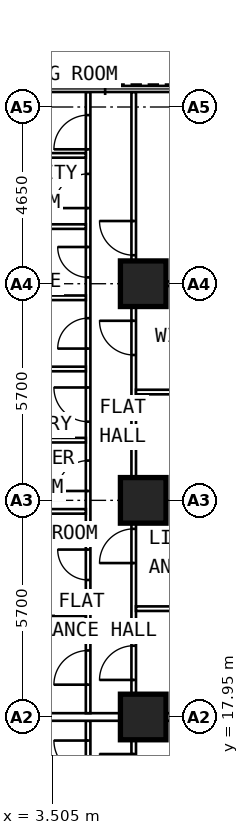
"""IFC4 building model, lengths in metres.
Left out: names, types, materials, properties, quantities, classifications, styles, units other than length and angle.
Written with IfcOpenShell. Run it as: python <this file> out.ifc"""

import sys

from ifc_helpers import new_model, si_unit, direction, frame, frame_2d, origin, origin_2d, place, context, subcontext, project, spatial, rectangle, extrude, element, fill, save


model = new_model("IFC4")
c1 = context("Model", 3, precision=1e-05, world=origin(), true_north=direction((0.0, 1.0)))
c2 = subcontext(c1, "Body", "Model", "MODEL_VIEW")
j1 = project(units=[si_unit("LENGTHUNIT", "METRE"), si_unit("PLANEANGLEUNIT", "RADIAN")], contexts=[c1])
p1 = place(None, origin())
s1 = spatial("IfcSite", under=j1, at=p1, CompositionType="ELEMENT")
p2 = place(p1, origin())
s2 = spatial("IfcBuilding", under=s1, at=p2, CompositionType="ELEMENT")
p3 = place(p2, frame((0.0, 0.0, 91.6)))
s3 = spatial("IfcBuildingStorey", under=s2, at=p3, CompositionType="ELEMENT", Elevation=91.6)
for number, where, z_axis, x_axis in (
    (1, (5.9, 17.95, 0.0), (0.0, 0.0, 1.0), (0.0, 1.0, 0.0)),
    (2, (5.9, 23.65, 0.0), (0.0, 0.0, 1.0), (0.0, 1.0, 0.0)),
    (3, (5.9, 29.35, 0.0), (0.0, 0.0, 1.0), (0.0, 1.0, 0.0)),
):
    element("IfcColumn", number, at=place(p3, frame(where, z_axis=z_axis, x_axis=x_axis)), inside=s3, PredefinedType="COLUMN", context=c2, shape_type="SweptSolid", body=[
        extrude(rectangle(XDim=1.2, YDim=1.2, at=origin_2d()), origin(), (0.0, 0.0, 1.0), 3.6),
    ])
p4 = place(p3, frame((4.45, 10.1, 0.0), z_axis=(0.0, 0.0, 1.0), x_axis=(0.0, 1.0, 0.0)))
e4 = element("IfcWall", 4, at=p4, inside=s3, PredefinedType="PARTITIONING", context=c2, shape_type="SweptSolid", body=[
    extrude(rectangle(XDim=7.75, YDim=0.12, at=frame_2d((3.875, 0.0))), origin(), (0.0, 0.0, 1.0), 3.35),
])
p5 = place(p4, frame((0.75, 0.0, 0.0)))
e5 = element("IfcOpeningElement", 5, at=p5, cuts=e4, PredefinedType="OPENING", context=c2, shape_type="SweptSolid", body=[
    extrude(rectangle(XDim=0.9, YDim=2.1, at=frame_2d((0.45, 1.05))), frame((0.0, 0.072, 0.0), z_axis=(0.0, -1.0, 0.0), x_axis=(1.0, 0.0, 0.0)), (0.0, 0.0, 1.0), 0.144),
])
p6 = place(p4, frame((3.705, 0.0, 0.0)))
e6 = element("IfcOpeningElement", 6, at=p6, cuts=e4, PredefinedType="OPENING", context=c2, shape_type="SweptSolid", body=[
    extrude(rectangle(XDim=0.8, YDim=2.1, at=frame_2d((0.4, 1.05))), frame((0.0, 0.072, 0.0), z_axis=(0.0, -1.0, 0.0), x_axis=(1.0, 0.0, 0.0)), (0.0, 0.0, 1.0), 0.144),
])
p7 = place(p4, frame((6.33, 0.0, 0.0)))
e7 = element("IfcOpeningElement", 7, at=p7, cuts=e4, PredefinedType="OPENING", context=c2, shape_type="SweptSolid", body=[
    extrude(rectangle(XDim=0.9, YDim=2.1, at=frame_2d((0.45, 1.05))), frame((0.0, 0.072, 0.0), z_axis=(0.0, -1.0, 0.0), x_axis=(1.0, 0.0, 0.0)), (0.0, 0.0, 1.0), 0.144),
])
p8 = place(p3, frame((5.65, 9.6, 0.0), z_axis=(0.0, 0.0, 1.0), x_axis=(0.0, 1.0, 0.0)))
e8 = element("IfcWall", 8, at=p8, inside=s3, PredefinedType="PARTITIONING", context=c2, shape_type="SweptSolid", body=[
    extrude(rectangle(XDim=8.1, YDim=0.12, at=frame_2d((4.05, 0.0))), origin(), (0.0, 0.0, 1.0), 3.35),
])
p9 = place(p8, frame((3.4, 0.0, 0.0)))
e9 = element("IfcOpeningElement", 9, at=p9, cuts=e8, PredefinedType="OPENING", context=c2, shape_type="SweptSolid", body=[
    extrude(rectangle(XDim=0.9, YDim=2.1, at=frame_2d((0.45, 1.05))), frame((0.0, 0.072, 0.0), z_axis=(0.0, -1.0, 0.0), x_axis=(1.0, 0.0, 0.0)), (0.0, 0.0, 1.0), 0.144),
])
p10 = place(p8, frame((6.475, 0.0, 0.0)))
e10 = element("IfcOpeningElement", 10, at=p10, cuts=e8, PredefinedType="OPENING", context=c2, shape_type="SweptSolid", body=[
    extrude(rectangle(XDim=0.9, YDim=2.1, at=frame_2d((0.45, 1.05))), frame((0.0, 0.072, 0.0), z_axis=(0.0, -1.0, 0.0), x_axis=(1.0, 0.0, 0.0)), (0.0, 0.0, 1.0), 0.144),
])
p11 = place(p3, frame((4.45, 18.05, 0.0), z_axis=(0.0, 0.0, 1.0), x_axis=(0.0, 1.0, 0.0)))
e11 = element("IfcWall", 11, at=p11, inside=s3, PredefinedType="PARTITIONING", context=c2, shape_type="SweptSolid", body=[
    extrude(rectangle(XDim=16.345, YDim=0.12, at=frame_2d((8.172, 0.0))), origin(), (0.0, 0.0, 1.0), 3.35),
])
p12 = place(p11, frame((0.75, 0.0, 0.0)))
e12 = element("IfcOpeningElement", 12, at=p12, cuts=e11, PredefinedType="OPENING", context=c2, shape_type="SweptSolid", body=[
    extrude(rectangle(XDim=0.9, YDim=2.1, at=frame_2d((0.45, 1.05))), frame((0.0, 0.072, 0.0), z_axis=(0.0, -1.0, 0.0), x_axis=(1.0, 0.0, 0.0)), (0.0, 0.0, 1.0), 0.144),
])
p13 = place(p11, frame((3.505, 0.0, 0.0)))
e13 = element("IfcOpeningElement", 13, at=p13, cuts=e11, PredefinedType="OPENING", context=c2, shape_type="SweptSolid", body=[
    extrude(rectangle(XDim=0.8, YDim=2.1, at=frame_2d((0.4, 1.05))), frame((0.0, 0.072, 0.0), z_axis=(0.0, -1.0, 0.0), x_axis=(1.0, 0.0, 0.0)), (0.0, 0.0, 1.0), 0.144),
])
p14 = place(p11, frame((5.847, 0.0, 0.0)))
e14 = element("IfcOpeningElement", 14, at=p14, cuts=e11, PredefinedType="OPENING", context=c2, shape_type="SweptSolid", body=[
    extrude(rectangle(XDim=0.8, YDim=2.1, at=frame_2d((0.4, 1.05))), frame((0.0, 0.072, 0.0), z_axis=(0.0, -1.0, 0.0), x_axis=(1.0, 0.0, 0.0)), (0.0, 0.0, 1.0), 0.144),
])
p15 = place(p11, frame((7.67, 0.0, 0.0)))
e15 = element("IfcOpeningElement", 15, at=p15, cuts=e11, PredefinedType="OPENING", context=c2, shape_type="SweptSolid", body=[
    extrude(rectangle(XDim=0.9, YDim=2.1, at=frame_2d((0.45, 1.05))), frame((0.0, 0.072, 0.0), z_axis=(0.0, -1.0, 0.0), x_axis=(1.0, 0.0, 0.0)), (0.0, 0.0, 1.0), 0.144),
])
p16 = place(p11, frame((9.593, 0.0, 0.0)))
e16 = element("IfcOpeningElement", 16, at=p16, cuts=e11, PredefinedType="OPENING", context=c2, shape_type="SweptSolid", body=[
    extrude(rectangle(XDim=0.8, YDim=2.1, at=frame_2d((0.4, 1.05))), frame((0.0, 0.072, 0.0), z_axis=(0.0, -1.0, 0.0), x_axis=(1.0, 0.0, 0.0)), (0.0, 0.0, 1.0), 0.144),
])
p17 = place(p11, frame((11.467, 0.0, 0.0)))
e17 = element("IfcOpeningElement", 17, at=p17, cuts=e11, PredefinedType="OPENING", context=c2, shape_type="SweptSolid", body=[
    extrude(rectangle(XDim=0.8, YDim=2.1, at=frame_2d((0.4, 1.05))), frame((0.0, 0.072, 0.0), z_axis=(0.0, -1.0, 0.0), x_axis=(1.0, 0.0, 0.0)), (0.0, 0.0, 1.0), 0.144),
])
p18 = place(p11, frame((13.29, 0.0, 0.0)))
e18 = element("IfcOpeningElement", 18, at=p18, cuts=e11, PredefinedType="OPENING", context=c2, shape_type="SweptSolid", body=[
    extrude(rectangle(XDim=0.9, YDim=2.1, at=frame_2d((0.45, 1.05))), frame((0.0, 0.072, 0.0), z_axis=(0.0, -1.0, 0.0), x_axis=(1.0, 0.0, 0.0)), (0.0, 0.0, 1.0), 0.144),
])
p19 = place(p11, frame((14.837, 0.0, 0.0)))
e19 = element("IfcOpeningElement", 19, at=p19, cuts=e11, PredefinedType="OPENING", context=c2, shape_type="SweptSolid", body=[
    extrude(rectangle(XDim=0.9, YDim=2.1, at=frame_2d((0.45, 1.05))), frame((0.0, 0.072, 0.0), z_axis=(0.0, -1.0, 0.0), x_axis=(1.0, 0.0, 0.0)), (0.0, 0.0, 1.0), 0.144),
])
p20 = place(p3, frame((5.65, 18.05, 0.0), z_axis=(0.0, 0.0, 1.0), x_axis=(0.0, 1.0, 0.0)))
e20 = element("IfcWall", 20, at=p20, inside=s3, PredefinedType="PARTITIONING", context=c2, shape_type="SweptSolid", body=[
    extrude(rectangle(XDim=16.345, YDim=0.12, at=frame_2d((8.172, 0.0))), origin(), (0.0, 0.0, 1.0), 3.35),
])
p21 = place(p20, frame((0.875, 0.0, 0.0)))
e21 = element("IfcOpeningElement", 21, at=p21, cuts=e20, PredefinedType="OPENING", context=c2, shape_type="SweptSolid", body=[
    extrude(rectangle(XDim=0.9, YDim=2.1, at=frame_2d((0.45, 1.05))), frame((0.0, 0.072, 0.0), z_axis=(0.0, -1.0, 0.0), x_axis=(1.0, 0.0, 0.0)), (0.0, 0.0, 1.0), 0.144),
])
p22 = place(p20, frame((3.95, 0.0, 0.0)))
e22 = element("IfcOpeningElement", 22, at=p22, cuts=e20, PredefinedType="OPENING", context=c2, shape_type="SweptSolid", body=[
    extrude(rectangle(XDim=0.9, YDim=2.1, at=frame_2d((0.45, 1.05))), frame((0.0, 0.072, 0.0), z_axis=(0.0, -1.0, 0.0), x_axis=(1.0, 0.0, 0.0)), (0.0, 0.0, 1.0), 0.144),
])
p23 = place(p20, frame((9.425, 0.0, 0.0)))
e23 = element("IfcOpeningElement", 23, at=p23, cuts=e20, PredefinedType="OPENING", context=c2, shape_type="SweptSolid", body=[
    extrude(rectangle(XDim=0.9, YDim=2.1, at=frame_2d((0.45, 1.05))), frame((0.0, 0.072, 0.0), z_axis=(0.0, -1.0, 0.0), x_axis=(1.0, 0.0, 0.0)), (0.0, 0.0, 1.0), 0.144),
])
p24 = place(p20, frame((12.05, 0.0, 0.0)))
e24 = element("IfcOpeningElement", 24, at=p24, cuts=e20, PredefinedType="OPENING", context=c2, shape_type="SweptSolid", body=[
    extrude(rectangle(XDim=0.9, YDim=2.1, at=frame_2d((0.45, 1.05))), frame((0.0, 0.072, 0.0), z_axis=(0.0, -1.0, 0.0), x_axis=(1.0, 0.0, 0.0)), (0.0, 0.0, 1.0), 0.144),
])
for number, where, z_axis, x_axis in (
    (25, (5.71, 20.8, 0.0), (0.0, 0.0, 1.0), (1.0, 0.0, 0.0)),
    (26, (5.71, 26.5, 0.0), (0.0, 0.0, 1.0), (1.0, 0.0, 0.0)),
):
    element("IfcWall", number, at=place(p3, frame(where, z_axis=z_axis, x_axis=x_axis)), inside=s3, PredefinedType="PARTITIONING", context=c2, shape_type="SweptSolid", body=[
        extrude(rectangle(XDim=4.99, YDim=0.12, at=frame_2d((2.495, 0.0))), origin(), (0.0, 0.0, 1.0), 3.35),
    ])
p25 = place(p3, frame((5.71, 29.35, 0.0), z_axis=(0.0, 0.0, 1.0), x_axis=(1.0, 0.0, 0.0)))
e27 = element("IfcWall", 27, at=p25, inside=s3, PredefinedType="PARTITIONING", context=c2, shape_type="SweptSolid", body=[
    extrude(rectangle(XDim=4.99, YDim=0.12, at=frame_2d((2.495, 0.0))), origin(), (0.0, 0.0, 1.0), 2.45),
])
p26 = place(p3, frame((2.1, 20.55, 0.0), z_axis=(0.0, 0.0, 1.0), x_axis=(1.0, 0.0, 0.0)))
e28 = element("IfcWall", 28, at=p26, inside=s3, PredefinedType="PARTITIONING", context=c2, shape_type="SweptSolid", body=[
    extrude(rectangle(XDim=2.29, YDim=0.12, at=frame_2d((1.145, 0.0))), origin(), (0.0, 0.0, 1.0), 3.35),
])
p27 = place(p3, frame((2.1, 23.36, 0.0), z_axis=(0.0, 0.0, 1.0), x_axis=(1.0, 0.0, 0.0)))
e29 = element("IfcWall", 29, at=p27, inside=s3, PredefinedType="PARTITIONING", context=c2, shape_type="SweptSolid", body=[
    extrude(rectangle(XDim=2.29, YDim=0.12, at=frame_2d((1.145, 0.0))), origin(), (0.0, 0.0, 1.0), 2.45),
])
for number, where, z_axis, x_axis in (
    (30, (2.1, 25.233, 0.0), (0.0, 0.0, 1.0), (1.0, 0.0, 0.0)),
    (31, (2.1, 27.107, 0.0), (0.0, 0.0, 1.0), (1.0, 0.0, 0.0)),
):
    element("IfcWall", number, at=place(p3, frame(where, z_axis=z_axis, x_axis=x_axis)), inside=s3, PredefinedType="PARTITIONING", context=c2, shape_type="SweptSolid", body=[
        extrude(rectangle(XDim=2.29, YDim=0.12, at=frame_2d((1.145, 0.0))), origin(), (0.0, 0.0, 1.0), 3.35),
    ])
p28 = place(p3, frame((2.1, 28.98, 0.0), z_axis=(0.0, 0.0, 1.0), x_axis=(1.0, 0.0, 0.0)))
e32 = element("IfcWall", 32, at=p28, inside=s3, PredefinedType="PARTITIONING", context=c2, shape_type="SweptSolid", body=[
    extrude(rectangle(XDim=2.29, YDim=0.12, at=frame_2d((1.145, 0.0))), origin(), (0.0, 0.0, 1.0), 2.45),
])
for number, where, z_axis, x_axis in (
    (33, (2.1, 30.853, 0.0), (0.0, 0.0, 1.0), (1.0, 0.0, 0.0)),
    (34, (2.1, 32.727, 0.0), (0.0, 0.0, 1.0), (1.0, 0.0, 0.0)),
):
    element("IfcWall", number, at=place(p3, frame(where, z_axis=z_axis, x_axis=x_axis)), inside=s3, PredefinedType="PARTITIONING", context=c2, shape_type="SweptSolid", body=[
        extrude(rectangle(XDim=2.29, YDim=0.12, at=frame_2d((1.145, 0.0))), origin(), (0.0, 0.0, 1.0), 3.35),
    ])
p29 = place(p3, frame((2.1, 17.95, 0.0), z_axis=(0.0, 0.0, 1.0), x_axis=(1.0, 0.0, 0.0)))
e35 = element("IfcWall", 35, at=p29, inside=s3, PredefinedType="PARTITIONING", context=c2, shape_type="SweptSolid", body=[
    extrude(rectangle(XDim=8.6, YDim=0.2, at=frame_2d((4.3, 0.0))), origin(), (0.0, 0.0, 1.0), 2.45),
])
p30 = place(p10, origin())
e36 = element("IfcDoor", 36, at=p30, inside=s3, OperationType="SINGLE_SWING_RIGHT", PredefinedType="DOOR", context=c2, shape_type="SweptSolid", body=[
    extrude(rectangle(XDim=0.9, YDim=2.1, at=frame_2d((0.45, 1.05))), frame((0.0, 0.025, 0.0), z_axis=(0.0, -1.0, 0.0), x_axis=(1.0, 0.0, 0.0)), (0.0, 0.0, 1.0), 0.05),
])
fill(e10, e36)
p31 = place(p7, origin())
e37 = element("IfcDoor", 37, at=p31, inside=s3, OperationType="SINGLE_SWING_RIGHT", PredefinedType="DOOR", context=c2, shape_type="SweptSolid", body=[
    extrude(rectangle(XDim=0.9, YDim=2.1, at=frame_2d((0.45, 1.05))), frame((0.0, 0.025, 0.0), z_axis=(0.0, -1.0, 0.0), x_axis=(1.0, 0.0, 0.0)), (0.0, 0.0, 1.0), 0.05),
])
fill(e7, e37)
p32 = place(p21, origin())
e38 = element("IfcDoor", 38, at=p32, inside=s3, OperationType="SINGLE_SWING_LEFT", PredefinedType="DOOR", context=c2, shape_type="SweptSolid", body=[
    extrude(rectangle(XDim=0.9, YDim=2.1, at=frame_2d((0.45, 1.05))), frame((0.0, 0.025, 0.0), z_axis=(0.0, -1.0, 0.0), x_axis=(1.0, 0.0, 0.0)), (0.0, 0.0, 1.0), 0.05),
])
fill(e21, e38)
p33 = place(p22, origin())
e39 = element("IfcDoor", 39, at=p33, inside=s3, OperationType="SINGLE_SWING_LEFT", PredefinedType="DOOR", context=c2, shape_type="SweptSolid", body=[
    extrude(rectangle(XDim=0.9, YDim=2.1, at=frame_2d((0.45, 1.05))), frame((0.0, 0.025, 0.0), z_axis=(0.0, -1.0, 0.0), x_axis=(1.0, 0.0, 0.0)), (0.0, 0.0, 1.0), 0.05),
])
fill(e22, e39)
p34 = place(p23, origin())
e40 = element("IfcDoor", 40, at=p34, inside=s3, OperationType="SINGLE_SWING_RIGHT", PredefinedType="DOOR", context=c2, shape_type="SweptSolid", body=[
    extrude(rectangle(XDim=0.9, YDim=2.1, at=frame_2d((0.45, 1.05))), frame((0.0, 0.025, 0.0), z_axis=(0.0, -1.0, 0.0), x_axis=(1.0, 0.0, 0.0)), (0.0, 0.0, 1.0), 0.05),
])
fill(e23, e40)
p35 = place(p24, origin())
e41 = element("IfcDoor", 41, at=p35, inside=s3, OperationType="SINGLE_SWING_RIGHT", PredefinedType="DOOR", context=c2, shape_type="SweptSolid", body=[
    extrude(rectangle(XDim=0.9, YDim=2.1, at=frame_2d((0.45, 1.05))), frame((0.0, 0.025, 0.0), z_axis=(0.0, -1.0, 0.0), x_axis=(1.0, 0.0, 0.0)), (0.0, 0.0, 1.0), 0.05),
])
fill(e24, e41)
p36 = place(p12, origin())
e42 = element("IfcDoor", 42, at=p36, inside=s3, OperationType="SINGLE_SWING_LEFT", PredefinedType="DOOR", context=c2, shape_type="SweptSolid", body=[
    extrude(rectangle(XDim=0.9, YDim=2.1, at=frame_2d((0.45, 1.05))), frame((0.0, 0.025, 0.0), z_axis=(0.0, -1.0, 0.0), x_axis=(1.0, 0.0, 0.0)), (0.0, 0.0, 1.0), 0.05),
])
fill(e12, e42)
p37 = place(p13, origin())
e43 = element("IfcDoor", 43, at=p37, inside=s3, OperationType="SINGLE_SWING_RIGHT", PredefinedType="DOOR", context=c2, shape_type="SweptSolid", body=[
    extrude(rectangle(XDim=0.8, YDim=2.1, at=frame_2d((0.4, 1.05))), frame((0.0, 0.025, 0.0), z_axis=(0.0, -1.0, 0.0), x_axis=(1.0, 0.0, 0.0)), (0.0, 0.0, 1.0), 0.05),
])
fill(e13, e43)
p38 = place(p14, origin())
e44 = element("IfcDoor", 44, at=p38, inside=s3, OperationType="SINGLE_SWING_LEFT", PredefinedType="DOOR", context=c2, shape_type="SweptSolid", body=[
    extrude(rectangle(XDim=0.8, YDim=2.1, at=frame_2d((0.4, 1.05))), frame((0.0, 0.025, 0.0), z_axis=(0.0, -1.0, 0.0), x_axis=(1.0, 0.0, 0.0)), (0.0, 0.0, 1.0), 0.05),
])
fill(e14, e44)
p39 = place(p15, origin())
e45 = element("IfcDoor", 45, at=p39, inside=s3, OperationType="SINGLE_SWING_RIGHT", PredefinedType="DOOR", context=c2, shape_type="SweptSolid", body=[
    extrude(rectangle(XDim=0.9, YDim=2.1, at=frame_2d((0.45, 1.05))), frame((0.0, 0.025, 0.0), z_axis=(0.0, -1.0, 0.0), x_axis=(1.0, 0.0, 0.0)), (0.0, 0.0, 1.0), 0.05),
])
fill(e15, e45)
p40 = place(p16, origin())
e46 = element("IfcDoor", 46, at=p40, inside=s3, OperationType="SINGLE_SWING_LEFT", PredefinedType="DOOR", context=c2, shape_type="SweptSolid", body=[
    extrude(rectangle(XDim=0.8, YDim=2.1, at=frame_2d((0.4, 1.05))), frame((0.0, 0.025, 0.0), z_axis=(0.0, -1.0, 0.0), x_axis=(1.0, 0.0, 0.0)), (0.0, 0.0, 1.0), 0.05),
])
fill(e16, e46)
p41 = place(p17, origin())
e47 = element("IfcDoor", 47, at=p41, inside=s3, OperationType="SINGLE_SWING_RIGHT", PredefinedType="DOOR", context=c2, shape_type="SweptSolid", body=[
    extrude(rectangle(XDim=0.8, YDim=2.1, at=frame_2d((0.4, 1.05))), frame((0.0, 0.025, 0.0), z_axis=(0.0, -1.0, 0.0), x_axis=(1.0, 0.0, 0.0)), (0.0, 0.0, 1.0), 0.05),
])
fill(e17, e47)
p42 = place(p18, origin())
e48 = element("IfcDoor", 48, at=p42, inside=s3, OperationType="SINGLE_SWING_LEFT", PredefinedType="DOOR", context=c2, shape_type="SweptSolid", body=[
    extrude(rectangle(XDim=0.9, YDim=2.1, at=frame_2d((0.45, 1.05))), frame((0.0, 0.025, 0.0), z_axis=(0.0, -1.0, 0.0), x_axis=(1.0, 0.0, 0.0)), (0.0, 0.0, 1.0), 0.05),
])
fill(e18, e48)
p43 = place(p19, origin())
e49 = element("IfcDoor", 49, at=p43, inside=s3, OperationType="SINGLE_SWING_LEFT", PredefinedType="DOOR", context=c2, shape_type="SweptSolid", body=[
    extrude(rectangle(XDim=0.9, YDim=2.1, at=frame_2d((0.45, 1.05))), frame((0.0, 0.025, 0.0), z_axis=(0.0, -1.0, 0.0), x_axis=(1.0, 0.0, 0.0)), (0.0, 0.0, 1.0), 0.05),
])
fill(e19, e49)
save(model, sys.argv[1])
